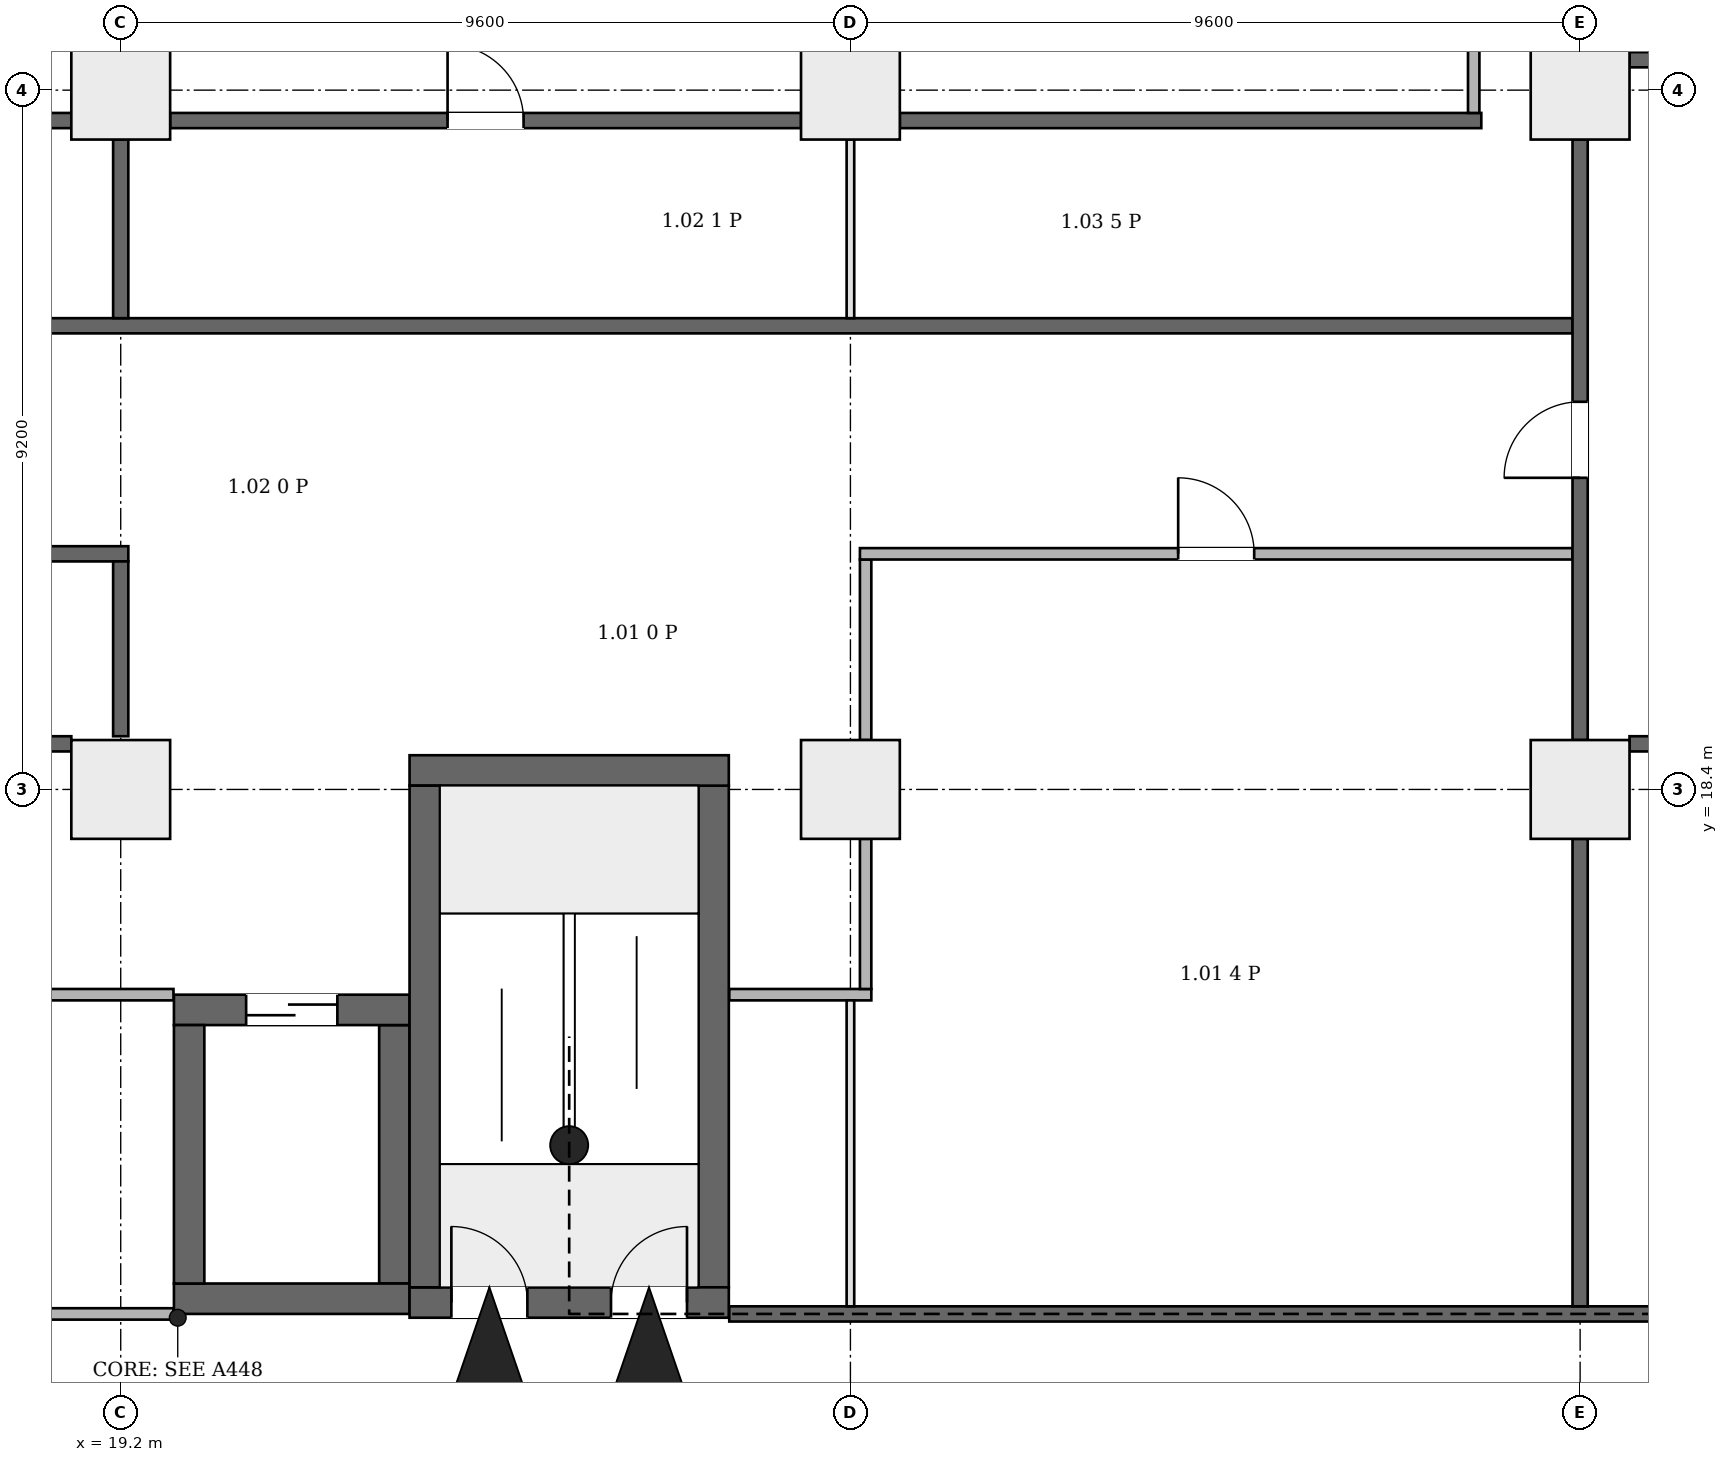
"""IFC4 building model, lengths in metres.
Left out: names, types, materials, properties, quantities, classifications, styles, units other than length and angle.
Written with IfcOpenShell. Run it as: python <this file> out.ifc"""

import sys

from ifc_helpers import new_model, si_unit, direction, frame, frame_2d, origin, origin_2d, place, context, subcontext, project, spatial, rectangle, extrude, element, fill, save


model = new_model("IFC4")
c1 = context("Model", 3, precision=1e-05, world=origin(), true_north=direction((0.0, 1.0)))
c2 = subcontext(c1, "Body", "Model", "MODEL_VIEW")
j1 = project(units=[si_unit("LENGTHUNIT", "METRE"), si_unit("PLANEANGLEUNIT", "RADIAN")], contexts=[c1])
p1 = place(None, origin())
s1 = spatial("IfcSite", under=j1, at=p1, CompositionType="ELEMENT")
p2 = place(p1, origin())
s2 = spatial("IfcBuilding", under=s1, at=p2, CompositionType="ELEMENT")
p3 = place(p2, frame((0.0, 0.0, 6.5)))
s3 = spatial("IfcBuildingStorey", under=s2, at=p3, CompositionType="ELEMENT", Elevation=6.5)
p4 = place(p3, frame((23.0, 11.65, 0.0), z_axis=(0.0, 0.0, 1.0), x_axis=(1.0, 0.0, 0.0)))
e1 = element("IfcWall", 1, at=p4, inside=s3, PredefinedType="SHEAR", context=c2, shape_type="SweptSolid", body=[
    extrude(rectangle(XDim=4.2, YDim=0.4, at=frame_2d((2.1, 0.0))), origin(), (0.0, 0.0, 1.0), 7.7),
])
p5 = place(p4, frame((0.55, 0.0, 0.0)))
e2 = element("IfcOpeningElement", 2, at=p5, cuts=e1, PredefinedType="OPENING", context=c2, shape_type="SweptSolid", body=[
    extrude(rectangle(XDim=1.0, YDim=2.1, at=frame_2d((0.5, 1.05))), frame((0.0, 0.21, 0.0), z_axis=(0.0, -1.0, 0.0), x_axis=(1.0, 0.0, 0.0)), (0.0, 0.0, 1.0), 0.42),
])
p6 = place(p4, frame((2.65, 0.0, 0.0)))
e3 = element("IfcOpeningElement", 3, at=p6, cuts=e1, PredefinedType="OPENING", context=c2, shape_type="SweptSolid", body=[
    extrude(rectangle(XDim=1.0, YDim=2.1, at=frame_2d((0.5, 1.05))), frame((0.0, 0.21, 0.0), z_axis=(0.0, -1.0, 0.0), x_axis=(1.0, 0.0, 0.0)), (0.0, 0.0, 1.0), 0.42),
])
p7 = place(p3, frame((23.0, 18.65, 0.0), z_axis=(0.0, 0.0, 1.0), x_axis=(1.0, 0.0, 0.0)))
e4 = element("IfcWall", 4, at=p7, inside=s3, PredefinedType="SHEAR", context=c2, shape_type="SweptSolid", body=[
    extrude(rectangle(XDim=4.2, YDim=0.4, at=frame_2d((2.1, 0.0))), origin(), (0.0, 0.0, 1.0), 7.7),
])
for number, where, z_axis, x_axis in (
    (5, (23.2, 11.85, 0.0), (0.0, 0.0, 1.0), (0.0, 1.0, 0.0)),
    (6, (27.0, 11.85, 0.0), (0.0, 0.0, 1.0), (0.0, 1.0, 0.0)),
):
    element("IfcWall", number, at=place(p3, frame(where, z_axis=z_axis, x_axis=x_axis)), inside=s3, PredefinedType="SHEAR", context=c2, shape_type="SweptSolid", body=[
        extrude(rectangle(XDim=6.6, YDim=0.4, at=frame_2d((3.3, 0.0))), origin(), (0.0, 0.0, 1.0), 7.7),
    ])
p8 = place(p3, frame((19.9, 11.7, 0.0), z_axis=(0.0, 0.0, 1.0), x_axis=(1.0, 0.0, 0.0)))
e7 = element("IfcWall", 7, at=p8, inside=s3, PredefinedType="SHEAR", context=c2, shape_type="SweptSolid", body=[
    extrude(rectangle(XDim=3.1, YDim=0.4, at=frame_2d((1.55, 0.0))), origin(), (0.0, 0.0, 1.0), 7.7),
])
p9 = place(p3, frame((19.9, 15.5, 0.0), z_axis=(0.0, 0.0, 1.0), x_axis=(1.0, 0.0, 0.0)))
e8 = element("IfcWall", 8, at=p9, inside=s3, PredefinedType="SHEAR", context=c2, shape_type="SweptSolid", body=[
    extrude(rectangle(XDim=3.1, YDim=0.4, at=frame_2d((1.55, 0.0))), origin(), (0.0, 0.0, 1.0), 7.7),
])
p10 = place(p9, frame((0.95, 0.0, 0.0)))
e9 = element("IfcOpeningElement", 9, at=p10, cuts=e8, PredefinedType="OPENING", context=c2, shape_type="SweptSolid", body=[
    extrude(rectangle(XDim=1.2, YDim=2.1, at=frame_2d((0.6, 1.05))), frame((0.0, 0.21, 0.0), z_axis=(0.0, -1.0, 0.0), x_axis=(1.0, 0.0, 0.0)), (0.0, 0.0, 1.0), 0.42),
])
for number, where, z_axis, x_axis in (
    (10, (20.1, 11.9, 0.0), (0.0, 0.0, 1.0), (0.0, 1.0, 0.0)),
    (11, (22.8, 11.9, 0.0), (0.0, 0.0, 1.0), (0.0, 1.0, 0.0)),
):
    element("IfcWall", number, at=place(p3, frame(where, z_axis=z_axis, x_axis=x_axis)), inside=s3, PredefinedType="SHEAR", context=c2, shape_type="SweptSolid", body=[
        extrude(rectangle(XDim=3.4, YDim=0.4, at=frame_2d((1.7, 0.0))), origin(), (0.0, 0.0, 1.0), 7.7),
    ])
for number, where, z_axis, x_axis in (
    (12, (19.2, 18.4, 0.0), (0.0, 0.0, 1.0), (1.0, 0.0, 0.0)),
    (13, (28.8, 18.4, 0.0), (0.0, 0.0, 1.0), (1.0, 0.0, 0.0)),
    (14, (38.4, 18.4, 0.0), (0.0, 0.0, 1.0), (1.0, 0.0, 0.0)),
    (15, (19.2, 27.6, 0.0), (0.0, 0.0, 1.0), (1.0, 0.0, 0.0)),
    (16, (28.8, 27.6, 0.0), (0.0, 0.0, 1.0), (1.0, 0.0, 0.0)),
    (17, (38.4, 27.6, 0.0), (0.0, 0.0, 1.0), (1.0, 0.0, 0.0)),
):
    element("IfcColumn", number, at=place(p3, frame(where, z_axis=z_axis, x_axis=x_axis)), inside=s3, PredefinedType="COLUMN", context=c2, shape_type="SweptSolid", body=[
        extrude(rectangle(XDim=1.3, YDim=1.3, at=origin_2d()), origin(), (0.0, 0.0, 1.0), 7.7),
    ])
p11 = place(p3, frame((0.206, 24.5, 0.0), z_axis=(0.0, 0.0, 1.0), x_axis=(1.0, 0.0, 0.0)))
e18 = element("IfcWall", 18, at=p11, inside=s3, PredefinedType="PARTITIONING", context=c2, shape_type="SweptSolid", body=[
    extrude(rectangle(XDim=38.094, YDim=0.2, at=frame_2d((19.047, 0.0))), origin(), (0.0, 0.0, 1.0), 7.35),
])
p12 = place(p3, frame((8.9, 21.5, 0.0), z_axis=(0.0, 0.0, 1.0), x_axis=(1.0, 0.0, 0.0)))
e19 = element("IfcWall", 19, at=p12, inside=s3, PredefinedType="PARTITIONING", context=c2, shape_type="SweptSolid", body=[
    extrude(rectangle(XDim=10.4, YDim=0.2, at=frame_2d((5.2, 0.0))), origin(), (0.0, 0.0, 1.0), 7.35),
])
p13 = place(p12, frame((4.965, 0.0, 0.0)))
e20 = element("IfcOpeningElement", 20, at=p13, cuts=e19, PredefinedType="OPENING", context=c2, shape_type="SweptSolid", body=[
    extrude(rectangle(XDim=1.0, YDim=2.1, at=frame_2d((0.5, 1.05))), frame((0.0, 0.11, 0.0), z_axis=(0.0, -1.0, 0.0), x_axis=(1.0, 0.0, 0.0)), (0.0, 0.0, 1.0), 0.22),
])
p14 = place(p3, frame((10.25, 19.0, 0.0), z_axis=(0.0, 0.0, 1.0), x_axis=(1.0, 0.0, 0.0)))
e21 = element("IfcWall", 21, at=p14, inside=s3, PredefinedType="PARTITIONING", context=c2, shape_type="SweptSolid", body=[
    extrude(rectangle(XDim=8.3, YDim=0.2, at=frame_2d((4.15, 0.0))), origin(), (0.0, 0.0, 1.0), 7.35),
])
p15 = place(p3, frame((10.25, 27.2, 0.0), z_axis=(0.0, 0.0, 1.0), x_axis=(1.0, 0.0, 0.0)))
e22 = element("IfcWall", 22, at=p15, inside=s3, PredefinedType="PARTITIONING", context=c2, shape_type="SweptSolid", body=[
    extrude(rectangle(XDim=8.3, YDim=0.2, at=frame_2d((4.15, 0.0))), origin(), (0.0, 0.0, 1.0), 7.35),
])
p16 = place(p15, frame((3.65, 0.0, 0.0)))
e23 = element("IfcOpeningElement", 23, at=p16, cuts=e22, PredefinedType="OPENING", context=c2, shape_type="SweptSolid", body=[
    extrude(rectangle(XDim=1.0, YDim=2.1, at=frame_2d((0.5, 1.05))), frame((0.0, 0.11, 0.0), z_axis=(0.0, -1.0, 0.0), x_axis=(1.0, 0.0, 0.0)), (0.0, 0.0, 1.0), 0.22),
])
p17 = place(p3, frame((10.325, 11.5, 0.0), z_axis=(0.0, 0.0, 1.0), x_axis=(1.0, 0.0, 0.0)))
e24 = element("IfcWall", 24, at=p17, inside=s3, PredefinedType="PARTITIONING", context=c2, shape_type="SweptSolid", body=[
    extrude(rectangle(XDim=9.569, YDim=0.15, at=frame_2d((4.785, 0.0))), origin(), (0.0, 0.0, 1.0), 7.35),
])
p18 = place(p3, frame((16.206, 15.7, 0.0), z_axis=(0.0, 0.0, 1.0), x_axis=(1.0, 0.0, 0.0)))
e25 = element("IfcWall", 25, at=p18, inside=s3, PredefinedType="PARTITIONING", context=c2, shape_type="SweptSolid", body=[
    extrude(rectangle(XDim=3.688, YDim=0.15, at=frame_2d((1.844, 0.0))), origin(), (0.0, 0.0, 1.0), 7.35),
])
p19 = place(p3, frame((19.2, 19.1, 0.0), z_axis=(0.0, 0.0, 1.0), x_axis=(0.0, 1.0, 0.0)))
e26 = element("IfcWall", 26, at=p19, inside=s3, PredefinedType="PARTITIONING", context=c2, shape_type="SweptSolid", body=[
    extrude(rectangle(XDim=2.3, YDim=0.2, at=frame_2d((1.15, 0.0))), origin(), (0.0, 0.0, 1.0), 6.95),
])
p20 = place(p3, frame((19.2, 24.6, 0.0), z_axis=(0.0, 0.0, 1.0), x_axis=(0.0, 1.0, 0.0)))
e27 = element("IfcWall", 27, at=p20, inside=s3, PredefinedType="PARTITIONING", context=c2, shape_type="SweptSolid", body=[
    extrude(rectangle(XDim=2.35, YDim=0.2, at=frame_2d((1.175, 0.0))), origin(), (0.0, 0.0, 1.0), 6.95),
])
p21 = place(p3, frame((19.85, 27.2, 0.0), z_axis=(0.0, 0.0, 1.0), x_axis=(1.0, 0.0, 0.0)))
e28 = element("IfcWall", 28, at=p21, inside=s3, PredefinedType="PARTITIONING", context=c2, shape_type="SweptSolid", body=[
    extrude(rectangle(XDim=8.3, YDim=0.2, at=frame_2d((4.15, 0.0))), origin(), (0.0, 0.0, 1.0), 7.35),
])
p22 = place(p21, frame((3.65, 0.0, 0.0)))
e29 = element("IfcOpeningElement", 29, at=p22, cuts=e28, PredefinedType="OPENING", context=c2, shape_type="SweptSolid", body=[
    extrude(rectangle(XDim=1.0, YDim=2.1, at=frame_2d((0.5, 1.05))), frame((0.0, 0.11, 0.0), z_axis=(0.0, -1.0, 0.0), x_axis=(1.0, 0.0, 0.0)), (0.0, 0.0, 1.0), 0.22),
])
p23 = place(p3, frame((27.206, 11.5, 0.0), z_axis=(0.0, 0.0, 1.0), x_axis=(1.0, 0.0, 0.0)))
e30 = element("IfcWall", 30, at=p23, inside=s3, PredefinedType="PARTITIONING", context=c2, shape_type="SweptSolid", body=[
    extrude(rectangle(XDim=26.494, YDim=0.2, at=frame_2d((13.247, 0.0))), origin(), (0.0, 0.0, 1.0), 7.35),
])
p24 = place(p23, frame((15.494, 0.0, 0.0)))
e31 = element("IfcOpeningElement", 31, at=p24, cuts=e30, PredefinedType="OPENING", context=c2, shape_type="SweptSolid", body=[
    extrude(rectangle(XDim=1.0, YDim=2.1, at=frame_2d((0.5, 1.05))), frame((0.0, 0.11, 0.0), z_axis=(0.0, -1.0, 0.0), x_axis=(1.0, 0.0, 0.0)), (0.0, 0.0, 1.0), 0.22),
])
p25 = place(p23, frame((23.059, 0.0, 0.0)))
e32 = element("IfcOpeningElement", 32, at=p25, cuts=e30, PredefinedType="OPENING", context=c2, shape_type="SweptSolid", body=[
    extrude(rectangle(XDim=1.0, YDim=2.1, at=frame_2d((0.5, 1.05))), frame((0.0, 0.11, 0.0), z_axis=(0.0, -1.0, 0.0), x_axis=(1.0, 0.0, 0.0)), (0.0, 0.0, 1.0), 0.22),
])
p26 = place(p3, frame((27.206, 15.7, 0.0), z_axis=(0.0, 0.0, 1.0), x_axis=(1.0, 0.0, 0.0)))
e33 = element("IfcWall", 33, at=p26, inside=s3, PredefinedType="PARTITIONING", context=c2, shape_type="SweptSolid", body=[
    extrude(rectangle(XDim=1.869, YDim=0.15, at=frame_2d((0.935, 0.0))), origin(), (0.0, 0.0, 1.0), 7.35),
])
p27 = place(p3, frame((28.8, 11.6, 0.0), z_axis=(0.0, 0.0, 1.0), x_axis=(0.0, 1.0, 0.0)))
e34 = element("IfcWall", 34, at=p27, inside=s3, PredefinedType="PARTITIONING", context=c2, shape_type="SweptSolid", body=[
    extrude(rectangle(XDim=4.025, YDim=0.1, at=frame_2d((2.012, 0.0))), origin(), (0.0, 0.0, 1.0), 6.95),
])
p28 = place(p3, frame((28.8, 24.6, 0.0), z_axis=(0.0, 0.0, 1.0), x_axis=(0.0, 1.0, 0.0)))
e35 = element("IfcWall", 35, at=p28, inside=s3, PredefinedType="PARTITIONING", context=c2, shape_type="SweptSolid", body=[
    extrude(rectangle(XDim=2.35, YDim=0.1, at=frame_2d((1.175, 0.0))), origin(), (0.0, 0.0, 1.0), 6.95),
])
p29 = place(p3, frame((29.0, 15.775, 0.0), z_axis=(0.0, 0.0, 1.0), x_axis=(0.0, 1.0, 0.0)))
e36 = element("IfcWall", 36, at=p29, inside=s3, PredefinedType="PARTITIONING", context=c2, shape_type="SweptSolid", body=[
    extrude(rectangle(XDim=1.975, YDim=0.15, at=frame_2d((0.988, 0.0))), origin(), (0.0, 0.0, 1.0), 6.95),
])
p30 = place(p3, frame((29.0, 19.05, 0.0), z_axis=(0.0, 0.0, 1.0), x_axis=(0.0, 1.0, 0.0)))
e37 = element("IfcWall", 37, at=p30, inside=s3, PredefinedType="PARTITIONING", context=c2, shape_type="SweptSolid", body=[
    extrude(rectangle(XDim=2.375, YDim=0.15, at=frame_2d((1.188, 0.0))), origin(), (0.0, 0.0, 1.0), 6.95),
])
p31 = place(p3, frame((28.925, 21.5, 0.0), z_axis=(0.0, 0.0, 1.0), x_axis=(1.0, 0.0, 0.0)))
e38 = element("IfcWall", 38, at=p31, inside=s3, PredefinedType="PARTITIONING", context=c2, shape_type="SweptSolid", body=[
    extrude(rectangle(XDim=9.375, YDim=0.15, at=frame_2d((4.688, 0.0))), origin(), (0.0, 0.0, 1.0), 7.35),
])
p32 = place(p31, frame((4.187, 0.0, 0.0)))
e39 = element("IfcOpeningElement", 39, at=p32, cuts=e38, PredefinedType="OPENING", context=c2, shape_type="SweptSolid", body=[
    extrude(rectangle(XDim=1.0, YDim=2.1, at=frame_2d((0.5, 1.05))), frame((0.0, 0.085, 0.0), z_axis=(0.0, -1.0, 0.0), x_axis=(1.0, 0.0, 0.0)), (0.0, 0.0, 1.0), 0.17),
])
p33 = place(p3, frame((29.45, 27.2, 0.0), z_axis=(0.0, 0.0, 1.0), x_axis=(1.0, 0.0, 0.0)))
e40 = element("IfcWall", 40, at=p33, inside=s3, PredefinedType="PARTITIONING", context=c2, shape_type="SweptSolid", body=[
    extrude(rectangle(XDim=7.65, YDim=0.2, at=frame_2d((3.825, 0.0))), origin(), (0.0, 0.0, 1.0), 7.35),
])
p34 = place(p3, frame((37.0, 27.3, 0.0), z_axis=(0.0, 0.0, 1.0), x_axis=(0.0, 1.0, 0.0)))
e41 = element("IfcWall", 41, at=p34, inside=s3, PredefinedType="PARTITIONING", context=c2, shape_type="SweptSolid", body=[
    extrude(rectangle(XDim=3.625, YDim=0.15, at=frame_2d((1.812, 0.0))), origin(), (0.0, 0.0, 1.0), 7.35),
])
p35 = place(p3, frame((38.4, 11.6, 0.0), z_axis=(0.0, 0.0, 1.0), x_axis=(0.0, 1.0, 0.0)))
e42 = element("IfcWall", 42, at=p35, inside=s3, PredefinedType="PARTITIONING", context=c2, shape_type="SweptSolid", body=[
    extrude(rectangle(XDim=6.15, YDim=0.2, at=frame_2d((3.075, 0.0))), origin(), (0.0, 0.0, 1.0), 6.95),
])
p36 = place(p3, frame((38.4, 19.05, 0.0), z_axis=(0.0, 0.0, 1.0), x_axis=(0.0, 1.0, 0.0)))
e43 = element("IfcWall", 43, at=p36, inside=s3, PredefinedType="PARTITIONING", context=c2, shape_type="SweptSolid", body=[
    extrude(rectangle(XDim=7.9, YDim=0.2, at=frame_2d((3.95, 0.0))), origin(), (0.0, 0.0, 1.0), 6.95),
])
p37 = place(p36, frame((3.45, 0.0, 0.0)))
e44 = element("IfcOpeningElement", 44, at=p37, cuts=e43, PredefinedType="OPENING", context=c2, shape_type="SweptSolid", body=[
    extrude(rectangle(XDim=1.0, YDim=2.1, at=frame_2d((0.5, 1.05))), frame((0.0, 0.11, 0.0), z_axis=(0.0, -1.0, 0.0), x_axis=(1.0, 0.0, 0.0)), (0.0, 0.0, 1.0), 0.22),
])
for number, where, z_axis, x_axis in (
    (45, (39.05, 19.0, 0.0), (0.0, 0.0, 1.0), (1.0, 0.0, 0.0)),
    (46, (39.05, 28.0, 0.0), (0.0, 0.0, 1.0), (1.0, 0.0, 0.0)),
):
    element("IfcWall", number, at=place(p3, frame(where, z_axis=z_axis, x_axis=x_axis)), inside=s3, PredefinedType="PARTITIONING", context=c2, shape_type="SweptSolid", body=[
        extrude(rectangle(XDim=8.3, YDim=0.2, at=frame_2d((4.15, 0.0))), origin(), (0.0, 0.0, 1.0), 7.35),
    ])
p38 = place(p5, origin())
e47 = element("IfcDoor", 47, at=p38, inside=s3, OperationType="SINGLE_SWING_RIGHT", PredefinedType="DOOR", context=c2, shape_type="SweptSolid", body=[
    extrude(rectangle(XDim=1.0, YDim=2.1, at=frame_2d((0.5, 1.05))), frame((0.0, 0.025, 0.0), z_axis=(0.0, -1.0, 0.0), x_axis=(1.0, 0.0, 0.0)), (0.0, 0.0, 1.0), 0.05),
])
fill(e2, e47)
p39 = place(p6, origin())
e48 = element("IfcDoor", 48, at=p39, inside=s3, OperationType="SINGLE_SWING_LEFT", PredefinedType="DOOR", context=c2, shape_type="SweptSolid", body=[
    extrude(rectangle(XDim=1.0, YDim=2.1, at=frame_2d((0.5, 1.05))), frame((0.0, 0.025, 0.0), z_axis=(0.0, -1.0, 0.0), x_axis=(1.0, 0.0, 0.0)), (0.0, 0.0, 1.0), 0.05),
])
fill(e3, e48)
p40 = place(p10, origin())
e49 = element("IfcDoor", 49, at=p40, inside=s3, OperationType="DOUBLE_DOOR_SLIDING", PredefinedType="DOOR", context=c2, shape_type="SweptSolid", body=[
    extrude(rectangle(XDim=1.2, YDim=2.1, at=frame_2d((0.6, 1.05))), frame((0.0, 0.025, 0.0), z_axis=(0.0, -1.0, 0.0), x_axis=(1.0, 0.0, 0.0)), (0.0, 0.0, 1.0), 0.05),
])
fill(e9, e49)
p41 = place(p32, origin())
e50 = element("IfcDoor", 50, at=p41, inside=s3, OperationType="SINGLE_SWING_RIGHT", PredefinedType="DOOR", context=c2, shape_type="SweptSolid", body=[
    extrude(rectangle(XDim=1.0, YDim=2.1, at=frame_2d((0.5, 1.05))), frame((0.0, 0.025, 0.0), z_axis=(0.0, -1.0, 0.0), x_axis=(1.0, 0.0, 0.0)), (0.0, 0.0, 1.0), 0.05),
])
fill(e39, e50)
p42 = place(p22, origin())
e51 = element("IfcDoor", 51, at=p42, inside=s3, OperationType="SINGLE_SWING_RIGHT", PredefinedType="DOOR", context=c2, shape_type="SweptSolid", body=[
    extrude(rectangle(XDim=1.0, YDim=2.1, at=frame_2d((0.5, 1.05))), frame((0.0, 0.025, 0.0), z_axis=(0.0, -1.0, 0.0), x_axis=(1.0, 0.0, 0.0)), (0.0, 0.0, 1.0), 0.05),
])
fill(e29, e51)
p43 = place(p37, origin())
e52 = element("IfcDoor", 52, at=p43, inside=s3, OperationType="SINGLE_SWING_LEFT", PredefinedType="DOOR", context=c2, shape_type="SweptSolid", body=[
    extrude(rectangle(XDim=1.0, YDim=2.1, at=frame_2d((0.5, 1.05))), frame((0.0, 0.025, 0.0), z_axis=(0.0, -1.0, 0.0), x_axis=(1.0, 0.0, 0.0)), (0.0, 0.0, 1.0), 0.05),
])
fill(e44, e52)
save(model, sys.argv[1])
